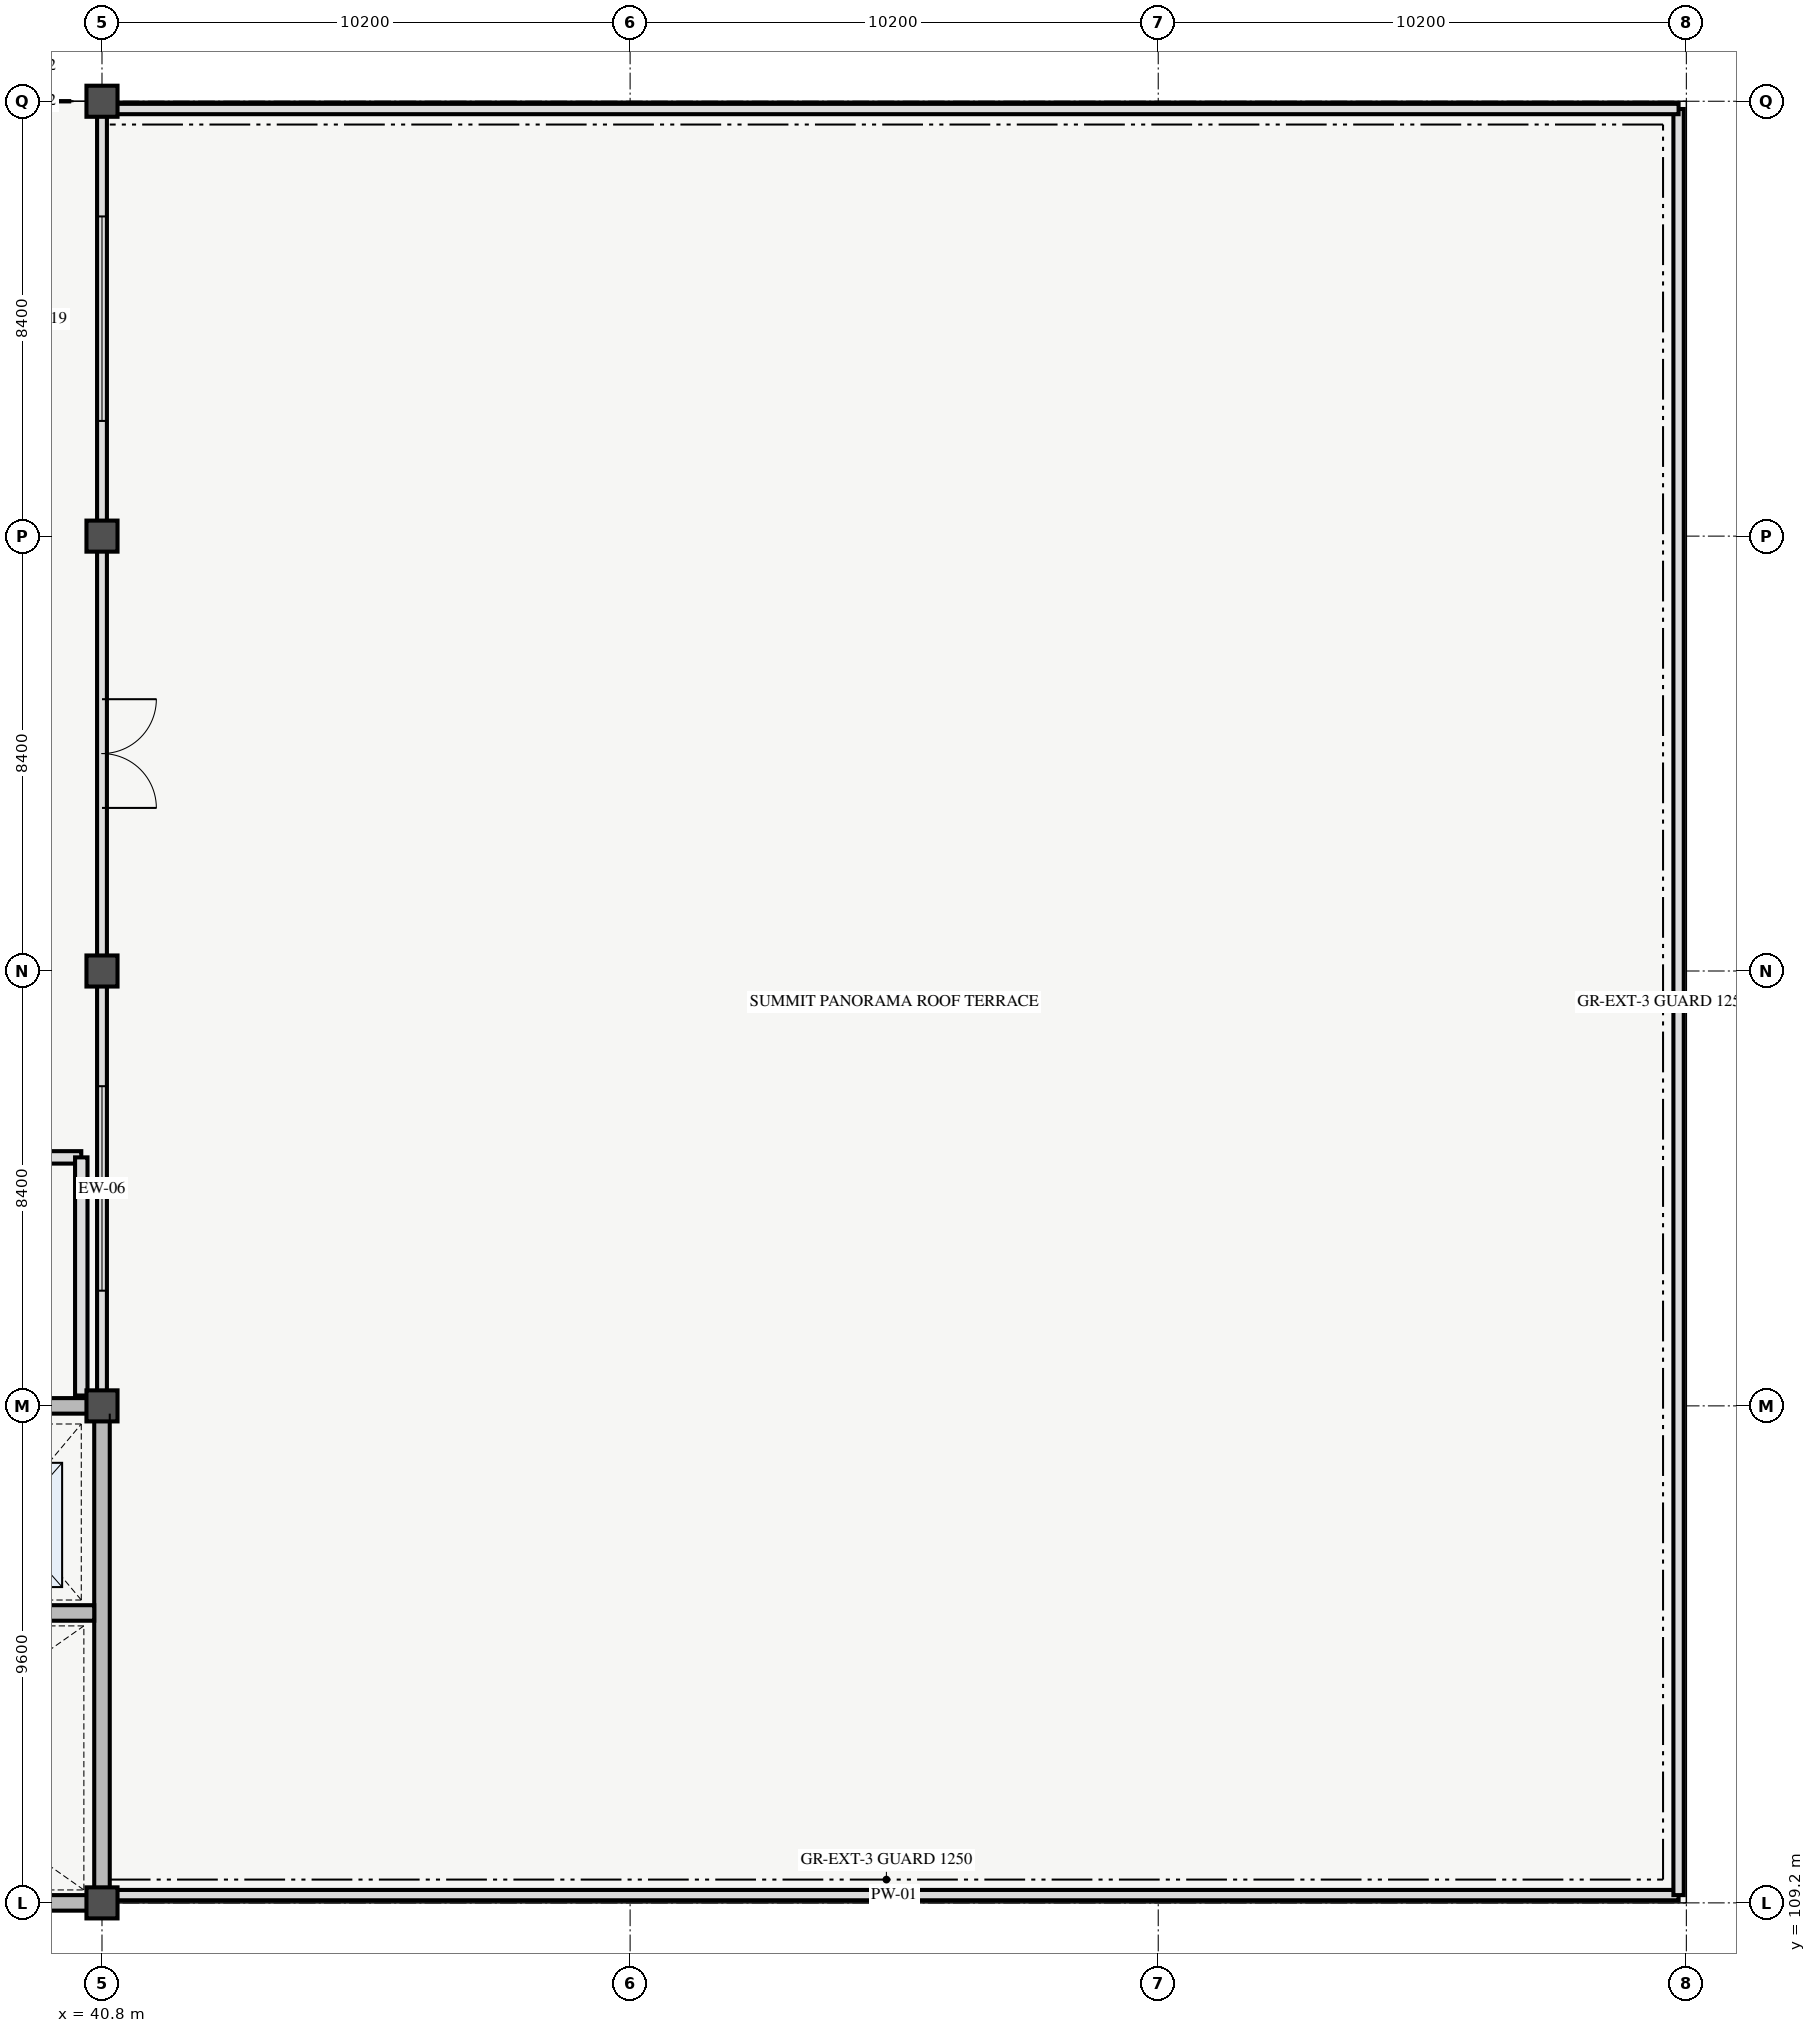
"""IFC4 building model, lengths in metres.
Left out: names, types, materials, properties, quantities, classifications, styles, units other than length and angle.
Written with IfcOpenShell. Run it as: python <this file> out.ifc"""

import sys

from ifc_helpers import new_model, si_unit, direction, frame, frame_2d, origin, origin_2d, place, context, subcontext, project, spatial, rectangle, extrude, element, fill, save


model = new_model("IFC4")
c1 = context("Model", 3, precision=1e-05, world=origin(), true_north=direction((0.0, 1.0)))
c2 = subcontext(c1, "Body", "Model", "MODEL_VIEW")
j1 = project(units=[si_unit("LENGTHUNIT", "METRE"), si_unit("PLANEANGLEUNIT", "RADIAN")], contexts=[c1])
p1 = place(None, origin())
s1 = spatial("IfcSite", under=j1, at=p1, CompositionType="ELEMENT")
p2 = place(p1, origin())
s2 = spatial("IfcBuilding", under=s1, at=p2, CompositionType="ELEMENT")
p3 = place(p2, frame((0.0, 0.0, 23.4)))
s3 = spatial("IfcBuildingStorey", under=s2, at=p3, CompositionType="ELEMENT", Elevation=23.4)
for number, where, z_axis, x_axis in (
    (1, (40.8, 109.2, 0.0), (0.0, 0.0, 1.0), (1.0, 0.0, 0.0)),
    (2, (40.8, 118.8, 0.0), (0.0, 0.0, 1.0), (1.0, 0.0, 0.0)),
    (3, (40.8, 127.2, 0.0), (0.0, 0.0, 1.0), (1.0, 0.0, 0.0)),
    (4, (40.8, 135.6, 0.0), (0.0, 0.0, 1.0), (1.0, 0.0, 0.0)),
    (5, (40.8, 144.0, 0.0), (0.0, 0.0, 1.0), (1.0, 0.0, 0.0)),
):
    element("IfcColumn", number, at=place(p3, frame(where, z_axis=z_axis, x_axis=x_axis)), inside=s3, PredefinedType="COLUMN", context=c2, shape_type="SweptSolid", body=[
        extrude(rectangle(XDim=0.6, YDim=0.6, at=origin_2d()), origin(), (0.0, 0.0, 1.0), 4.2),
    ])
p4 = place(p3, frame((30.6, 109.2, 0.0), z_axis=(0.0, 0.0, 1.0), x_axis=(1.0, 0.0, 0.0)))
e6 = element("IfcWall", 6, at=p4, inside=s3, PredefinedType="SHEAR", context=c2, shape_type="SweptSolid", body=[
    extrude(rectangle(XDim=10.2, YDim=0.3, at=frame_2d((5.1, 0.0))), origin(), (0.0, 0.0, 1.0), 4.2),
])
p5 = place(p3, frame((30.6, 118.8, 0.0), z_axis=(0.0, 0.0, 1.0), x_axis=(1.0, 0.0, 0.0)))
e7 = element("IfcWall", 7, at=p5, inside=s3, PredefinedType="SHEAR", context=c2, shape_type="SweptSolid", body=[
    extrude(rectangle(XDim=10.2, YDim=0.3, at=frame_2d((5.1, 0.0))), origin(), (0.0, 0.0, 1.0), 4.2),
])
p6 = place(p5, frame((1.2, 0.0, 0.0)))
e8 = element("IfcOpeningElement", 8, at=p6, cuts=e7, PredefinedType="OPENING", context=c2, shape_type="SweptSolid", body=[
    extrude(rectangle(XDim=1.16, YDim=2.2, at=frame_2d((0.58, 1.1))), frame((0.0, 0.16, 0.0), z_axis=(0.0, -1.0, 0.0), x_axis=(1.0, 0.0, 0.0)), (0.0, 0.0, 1.0), 0.32),
])
p7 = place(p5, frame((7.4, 0.0, 0.0)))
e9 = element("IfcOpeningElement", 9, at=p7, cuts=e7, PredefinedType="OPENING", context=c2, shape_type="SweptSolid", body=[
    extrude(rectangle(XDim=1.2, YDim=2.25, at=frame_2d((0.6, 1.125))), frame((0.0, 0.16, 0.0), z_axis=(0.0, -1.0, 0.0), x_axis=(1.0, 0.0, 0.0)), (0.0, 0.0, 1.0), 0.32),
])
p8 = place(p3, frame((40.8, 109.2, 0.0), z_axis=(0.0, 0.0, 1.0), x_axis=(0.0, 1.0, 0.0)))
e10 = element("IfcWall", 10, at=p8, inside=s3, PredefinedType="SHEAR", context=c2, shape_type="SweptSolid", body=[
    extrude(rectangle(XDim=9.6, YDim=0.3, at=frame_2d((4.8, 0.0))), origin(), (0.0, 0.0, 1.0), 4.2),
])
p9 = place(p3, frame((40.8, 119.04, 0.0), z_axis=(0.0, 0.0, 1.0), x_axis=(0.0, 1.0, 0.0)))
e11 = element("IfcWall", 11, at=p9, inside=s3, PredefinedType="STANDARD", context=c2, shape_type="SweptSolid", body=[
    extrude(rectangle(XDim=7.92, YDim=0.19, at=frame_2d((3.96, 0.0))), origin(), (0.0, 0.0, 1.0), 3.06),
])
p10 = place(p9, frame((1.985, 0.0, 0.9)))
e12 = element("IfcOpeningElement", 12, at=p10, cuts=e11, PredefinedType="OPENING", context=c2, shape_type="SweptSolid", body=[
    extrude(rectangle(XDim=3.95, YDim=2.02, at=frame_2d((1.975, 1.01))), frame((0.0, 0.105, 0.0), z_axis=(0.0, -1.0, 0.0), x_axis=(1.0, 0.0, 0.0)), (0.0, 0.0, 1.0), 0.21),
])
p11 = place(p3, frame((40.8, 127.44, 0.0), z_axis=(0.0, 0.0, 1.0), x_axis=(0.0, 1.0, 0.0)))
e13 = element("IfcWall", 13, at=p11, inside=s3, PredefinedType="STANDARD", context=c2, shape_type="SweptSolid", body=[
    extrude(rectangle(XDim=7.92, YDim=0.19, at=frame_2d((3.96, 0.0))), origin(), (0.0, 0.0, 1.0), 3.06),
])
p12 = place(p11, frame((2.91, 0.0, 0.0)))
e14 = element("IfcOpeningElement", 14, at=p12, cuts=e13, PredefinedType="OPENING", context=c2, shape_type="SweptSolid", body=[
    extrude(rectangle(XDim=2.1, YDim=2.3, at=frame_2d((1.05, 1.15))), frame((0.0, 0.105, 0.0), z_axis=(0.0, -1.0, 0.0), x_axis=(1.0, 0.0, 0.0)), (0.0, 0.0, 1.0), 0.21),
])
p13 = place(p3, frame((40.8, 135.84, 0.0), z_axis=(0.0, 0.0, 1.0), x_axis=(0.0, 1.0, 0.0)))
e15 = element("IfcWall", 15, at=p13, inside=s3, PredefinedType="STANDARD", context=c2, shape_type="SweptSolid", body=[
    extrude(rectangle(XDim=7.92, YDim=0.19, at=frame_2d((3.96, 0.0))), origin(), (0.0, 0.0, 1.0), 3.06),
])
p14 = place(p13, frame((1.985, 0.0, 0.9)))
e16 = element("IfcOpeningElement", 16, at=p14, cuts=e15, PredefinedType="OPENING", context=c2, shape_type="SweptSolid", body=[
    extrude(rectangle(XDim=3.95, YDim=2.02, at=frame_2d((1.975, 1.01))), frame((0.0, 0.105, 0.0), z_axis=(0.0, -1.0, 0.0), x_axis=(1.0, 0.0, 0.0)), (0.0, 0.0, 1.0), 0.21),
])
p15 = place(p3, frame((40.95, 109.35, 0.0), z_axis=(0.0, 0.0, 1.0), x_axis=(1.0, 0.0, 0.0)))
e17 = element("IfcWall", 17, at=p15, inside=s3, PredefinedType="PARAPET", context=c2, shape_type="SweptSolid", body=[
    extrude(rectangle(XDim=30.3, YDim=0.2, at=frame_2d((15.15, 0.0))), origin(), (0.0, 0.0, 1.0), 1.1),
])
p16 = place(p3, frame((71.25, 109.35, 0.0), z_axis=(0.0, 0.0, 1.0), x_axis=(0.0, 1.0, 0.0)))
e18 = element("IfcWall", 18, at=p16, inside=s3, PredefinedType="PARAPET", context=c2, shape_type="SweptSolid", body=[
    extrude(rectangle(XDim=34.5, YDim=0.2, at=frame_2d((17.25, 0.0))), origin(), (0.0, 0.0, 1.0), 1.1),
])
p17 = place(p3, frame((71.25, 143.85, 0.0), z_axis=(0.0, 0.0, 1.0), x_axis=(-1.0, 0.0, 0.0)))
e19 = element("IfcWall", 19, at=p17, inside=s3, PredefinedType="PARAPET", context=c2, shape_type="SweptSolid", body=[
    extrude(rectangle(XDim=30.3, YDim=0.2, at=frame_2d((15.15, 0.0))), origin(), (0.0, 0.0, 1.0), 1.1),
])
p18 = place(p3, frame((30.75, 114.8, 0.0), z_axis=(0.0, 0.0, 1.0), x_axis=(1.0, 0.0, 0.0)))
e20 = element("IfcWall", 20, at=p18, inside=s3, PredefinedType="SHEAR", context=c2, shape_type="SweptSolid", body=[
    extrude(rectangle(XDim=9.9, YDim=0.3, at=frame_2d((4.95, 0.0))), origin(), (0.0, 0.0, 1.0), 4.2),
])
p19 = place(p3, frame((31.0, 123.6, 0.0), z_axis=(0.0, 0.0, 1.0), x_axis=(1.0, 0.0, 0.0)))
e21 = element("IfcWall", 21, at=p19, inside=s3, PredefinedType="PARTITIONING", context=c2, shape_type="SweptSolid", body=[
    extrude(rectangle(XDim=9.4, YDim=0.24, at=frame_2d((4.7, 0.0))), origin(), (0.0, 0.0, 1.0), 3.06),
])
p20 = place(p3, frame((40.4, 119.0, 0.0), z_axis=(0.0, 0.0, 1.0), x_axis=(0.0, 1.0, 0.0)))
e22 = element("IfcWall", 22, at=p20, inside=s3, PredefinedType="PARTITIONING", context=c2, shape_type="SweptSolid", body=[
    extrude(rectangle(XDim=4.6, YDim=0.24, at=frame_2d((2.3, 0.0))), origin(), (0.0, 0.0, 1.0), 3.06),
])
p21 = place(p10, origin())
e23 = element("IfcWindow", 23, at=p21, inside=s3, PartitioningType="TRIPLE_PANEL_VERTICAL", PredefinedType="WINDOW", context=c2, shape_type="SweptSolid", body=[
    extrude(rectangle(XDim=3.95, YDim=2.02, at=frame_2d((1.975, 1.01))), frame((0.0, 0.03, 0.0), z_axis=(0.0, -1.0, 0.0), x_axis=(1.0, 0.0, 0.0)), (0.0, 0.0, 1.0), 0.06),
])
fill(e12, e23)
p22 = place(p12, frame((2.1, 0.0, 0.0), z_axis=(0.0, 0.0, 1.0), x_axis=(-1.0, 0.0, 0.0)))
e24 = element("IfcDoor", 24, at=p22, inside=s3, OperationType="DOUBLE_DOOR_SINGLE_SWING", PredefinedType="DOOR", context=c2, shape_type="SweptSolid", body=[
    extrude(rectangle(XDim=2.1, YDim=2.3, at=frame_2d((1.05, 1.15))), frame((0.0, 0.025, 0.0), z_axis=(0.0, -1.0, 0.0), x_axis=(1.0, 0.0, 0.0)), (0.0, 0.0, 1.0), 0.05),
])
fill(e14, e24)
p23 = place(p14, origin())
e25 = element("IfcWindow", 25, at=p23, inside=s3, PartitioningType="TRIPLE_PANEL_VERTICAL", PredefinedType="WINDOW", context=c2, shape_type="SweptSolid", body=[
    extrude(rectangle(XDim=3.95, YDim=2.02, at=frame_2d((1.975, 1.01))), frame((0.0, 0.03, 0.0), z_axis=(0.0, -1.0, 0.0), x_axis=(1.0, 0.0, 0.0)), (0.0, 0.0, 1.0), 0.06),
])
fill(e16, e25)
save(model, sys.argv[1])
